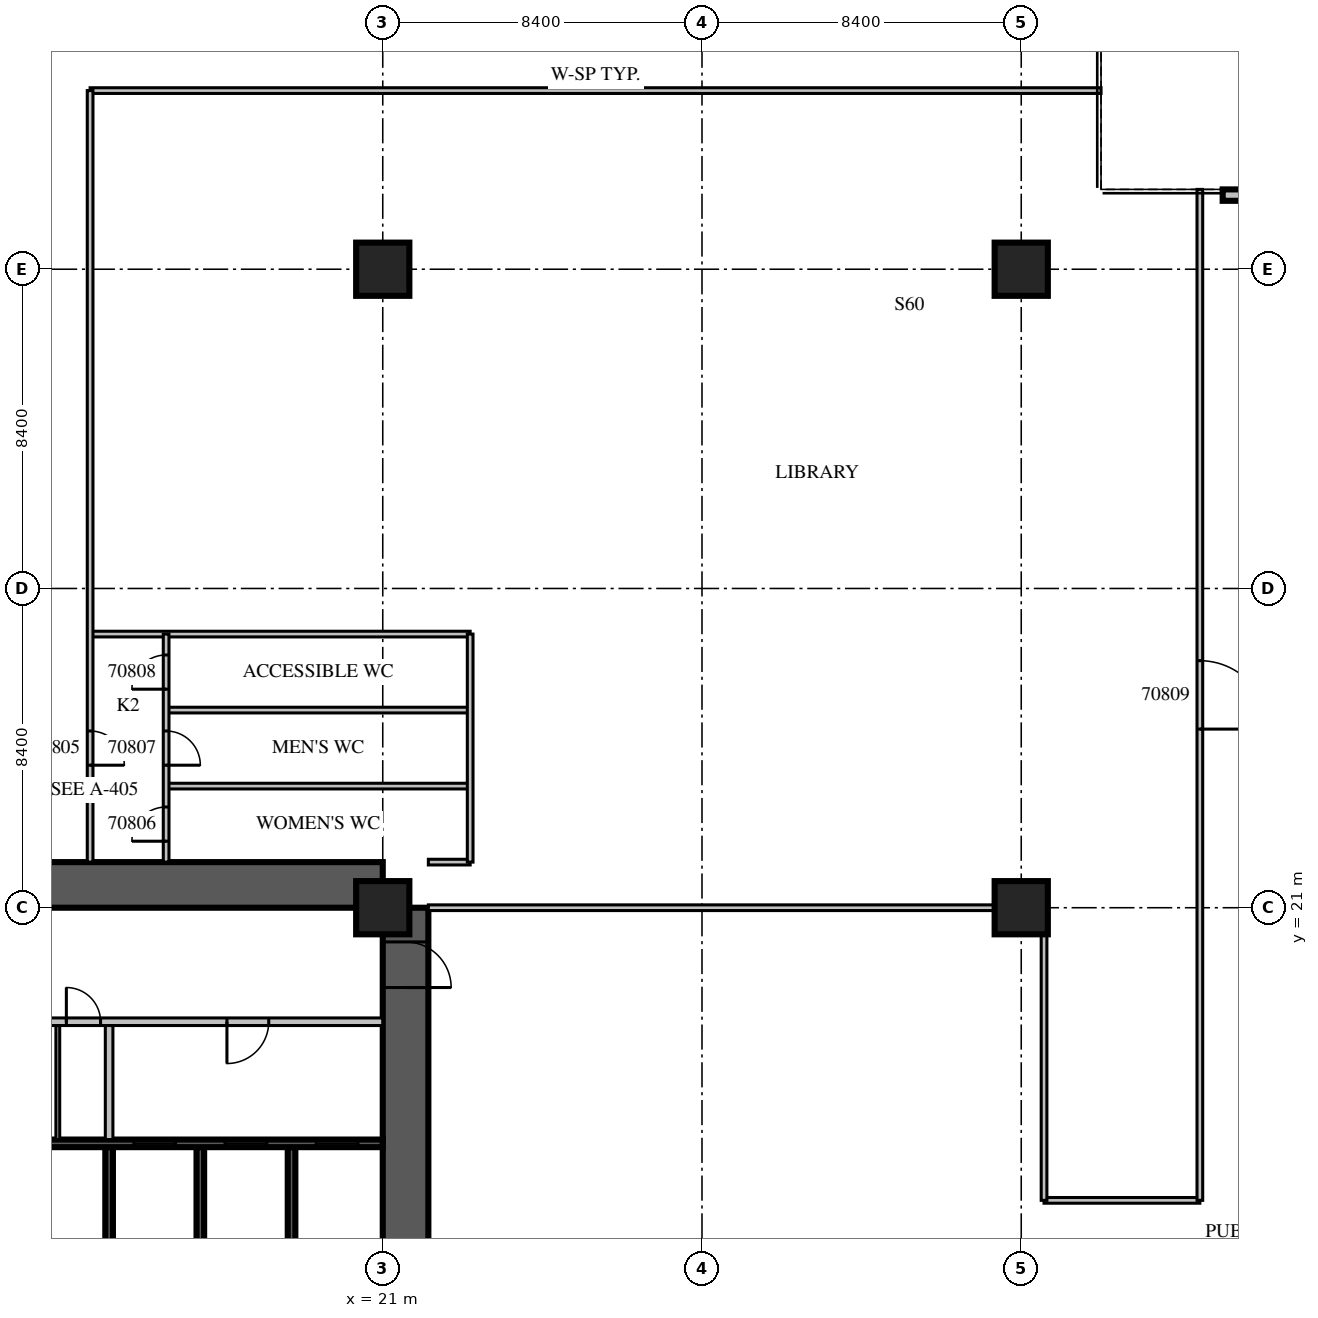
"""IFC4 building model, lengths in metres.
Left out: names, types, materials, properties, quantities, classifications, styles, units other than length and angle.
Written with IfcOpenShell. Run it as: python <this file> out.ifc"""

import sys

from ifc_helpers import new_model, si_unit, direction, frame, frame_2d, origin, origin_2d, place, context, subcontext, project, spatial, rectangle, extrude, source, transform, mapped, element, fill, save


model = new_model("IFC4")
c1 = context("Model", 3, precision=1e-05, world=origin(), true_north=direction((0.0, 1.0)))
c2 = subcontext(c1, "Body", "Model", "MODEL_VIEW")
j1 = project(units=[si_unit("LENGTHUNIT", "METRE"), si_unit("PLANEANGLEUNIT", "RADIAN")], contexts=[c1])
p1 = place(None, origin())
s1 = spatial("IfcSite", under=j1, at=p1, CompositionType="ELEMENT")
p2 = place(p1, origin())
s2 = spatial("IfcBuilding", under=s1, at=p2, CompositionType="ELEMENT")
p3 = place(p2, frame((0.0, 0.0, 29.1)))
s3 = spatial("IfcBuildingStorey", under=s2, at=p3, CompositionType="ELEMENT", Elevation=29.1)
m1 = source(origin(), c2, "Body", "SweptSolid", [
    extrude(rectangle(XDim=1.4, YDim=1.4, at=origin_2d()), origin(), (0.0, 0.0, 1.0), 5.4),
])
for number, where, z_axis, x_axis in (
    (1, (21.0, 21.0, 0.0), (0.0, 0.0, 1.0), (1.0, 0.0, 0.0)),
    (2, (21.0, 37.8, 0.0), (0.0, 0.0, 1.0), (1.0, 0.0, 0.0)),
    (3, (37.8, 21.0, 0.0), (0.0, 0.0, 1.0), (1.0, 0.0, 0.0)),
    (4, (37.8, 37.8, 0.0), (0.0, 0.0, 1.0), (1.0, 0.0, 0.0)),
):
    element("IfcColumn", number, at=place(p3, frame(where, z_axis=z_axis, x_axis=x_axis)), inside=s3, PredefinedType="COLUMN", context=c2, shape_type="MappedRepresentation", body=[
        mapped(m1, transform((0.0, 0.0, 0.0), scale=1.0)),
    ])
m2 = source(origin(), c2, "Body", "SweptSolid", [
    extrude(rectangle(XDim=16.8, YDim=1.2, at=frame_2d((8.4, 0.0))), origin(), (0.0, 0.0, 1.0), 5.4),
])
p4 = place(p3, frame((21.6, 4.2, 0.0), z_axis=(0.0, 0.0, 1.0), x_axis=(0.0, 1.0, 0.0)))
e5 = element("IfcWall", 5, at=p4, inside=s3, PredefinedType="SHEAR", context=c2, shape_type="MappedRepresentation", body=[
    mapped(m2, transform((0.0, 0.0, 0.0), scale=1.0)),
])
m3 = source(origin(), c2, "Body", "SweptSolid", [
    extrude(rectangle(XDim=2.2, YDim=2.1, at=frame_2d((1.1, 1.05))), frame((0.0, 0.61, 0.0), z_axis=(0.0, -1.0, 0.0), x_axis=(1.0, 0.0, 0.0)), (0.0, 0.0, 1.0), 1.22),
])
p5 = place(p4, frame((4.2, 0.0, 0.0)))
e6 = element("IfcOpeningElement", 6, at=p5, cuts=e5, PredefinedType="OPENING", context=c2, shape_type="MappedRepresentation", body=[
    mapped(m3, transform((0.0, 0.0, 0.0), scale=1.0)),
])
m4 = source(origin(), c2, "Body", "SweptSolid", [
    extrude(rectangle(XDim=1.2, YDim=2.1, at=frame_2d((0.6, 1.05))), frame((0.0, 0.61, 0.0), z_axis=(0.0, -1.0, 0.0), x_axis=(1.0, 0.0, 0.0)), (0.0, 0.0, 1.0), 1.22),
])
p6 = place(p4, frame((14.7, 0.0, 0.0)))
e7 = element("IfcOpeningElement", 7, at=p6, cuts=e5, PredefinedType="OPENING", context=c2, shape_type="MappedRepresentation", body=[
    mapped(m4, transform((0.0, 0.0, 0.0), scale=1.0)),
])
p7 = place(p3, frame((4.2, 21.6, 0.0), z_axis=(0.0, 0.0, 1.0), x_axis=(1.0, 0.0, 0.0)))
e8 = element("IfcWall", 8, at=p7, inside=s3, PredefinedType="SHEAR", context=c2, shape_type="MappedRepresentation", body=[
    mapped(m2, transform((0.0, 0.0, 0.0), scale=1.0)),
])
p8 = place(p7, frame((6.2, 0.0, 0.0)))
e9 = element("IfcOpeningElement", 9, at=p8, cuts=e8, PredefinedType="OPENING", context=c2, shape_type="MappedRepresentation", body=[
    mapped(m4, transform((0.0, 0.0, 0.0), scale=1.0)),
])
m5 = source(origin(), c2, "Body", "SweptSolid", [
    extrude(rectangle(XDim=3.6, YDim=0.3, at=frame_2d((1.8, 0.0))), origin(), (0.0, 0.0, 1.0), 4.8),
])
p9 = place(p3, frame((46.7, 39.75, 0.0), z_axis=(0.0, 0.0, 1.0), x_axis=(-1.0, 0.0, 0.0)))
e10 = element("IfcWall", 10, at=p9, inside=s3, PredefinedType="STANDARD", context=c2, shape_type="MappedRepresentation", body=[
    mapped(m5, transform((0.0, 0.0, 0.0), scale=1.0)),
])
m6 = source(origin(), c2, "Body", "SweptSolid", [
    extrude(rectangle(XDim=1.8, YDim=2.4, at=frame_2d((0.9, 1.2))), frame((0.0, 0.16, 0.0), z_axis=(0.0, -1.0, 0.0), x_axis=(1.0, 0.0, 0.0)), (0.0, 0.0, 1.0), 0.32),
])
p10 = place(p9, frame((0.9, 0.0, 0.0)))
e11 = element("IfcOpeningElement", 11, at=p10, cuts=e10, PredefinedType="OPENING", context=c2, shape_type="MappedRepresentation", body=[
    mapped(m6, transform((0.0, 0.0, 0.0), scale=1.0)),
])
m7 = source(origin(), c2, "Body", "SweptSolid", [
    extrude(rectangle(XDim=3.0, YDim=0.2, at=frame_2d((1.5, 0.0))), origin(), (0.0, 0.0, 1.0), 5.4),
])
for number, where, z_axis, x_axis in (
    (12, (13.8, 11.7, 0.0), (0.0, 0.0, 1.0), (0.0, 1.0, 0.0)),
    (13, (16.2, 11.7, 0.0), (0.0, 0.0, 1.0), (0.0, 1.0, 0.0)),
    (14, (18.6, 11.7, 0.0), (0.0, 0.0, 1.0), (0.0, 1.0, 0.0)),
):
    element("IfcWall", number, at=place(p3, frame(where, z_axis=z_axis, x_axis=x_axis)), inside=s3, PredefinedType="SOLIDWALL", context=c2, shape_type="MappedRepresentation", body=[
        mapped(m7, transform((0.0, 0.0, 0.0), scale=1.0)),
    ])
m8 = source(origin(), c2, "Body", "SweptSolid", [
    extrude(rectangle(XDim=16.8, YDim=0.2, at=frame_2d((8.4, 0.0))), origin(), (0.0, 0.0, 1.0), 5.4),
])
p11 = place(p3, frame((4.2, 14.8, 0.0), z_axis=(0.0, 0.0, 1.0), x_axis=(1.0, 0.0, 0.0)))
e15 = element("IfcWall", 15, at=p11, inside=s3, PredefinedType="SOLIDWALL", context=c2, shape_type="MappedRepresentation", body=[
    mapped(m8, transform((0.0, 0.0, 0.0), scale=1.0)),
])
m9 = source(origin(), c2, "Body", "SweptSolid", [
    extrude(rectangle(XDim=1.1, YDim=2.1, at=frame_2d((0.55, 1.05))), frame((0.0, 0.11, 0.0), z_axis=(0.0, -1.0, 0.0), x_axis=(1.0, 0.0, 0.0)), (0.0, 0.0, 1.0), 0.22),
])
p12 = place(p11, frame((10.25, 0.0, 0.0)))
e16 = element("IfcOpeningElement", 16, at=p12, cuts=e15, PredefinedType="OPENING", context=c2, shape_type="MappedRepresentation", body=[
    mapped(m9, transform((0.0, 0.0, 0.0), scale=1.0)),
])
p13 = place(p11, frame((12.65, 0.0, 0.0)))
e17 = element("IfcOpeningElement", 17, at=p13, cuts=e15, PredefinedType="OPENING", context=c2, shape_type="MappedRepresentation", body=[
    mapped(m9, transform((0.0, 0.0, 0.0), scale=1.0)),
])
p14 = place(p11, frame((15.05, 0.0, 0.0)))
e18 = element("IfcOpeningElement", 18, at=p14, cuts=e15, PredefinedType="OPENING", context=c2, shape_type="MappedRepresentation", body=[
    mapped(m9, transform((0.0, 0.0, 0.0), scale=1.0)),
])
m10 = source(origin(), c2, "Body", "SweptSolid", [
    extrude(rectangle(XDim=11.45, YDim=0.2, at=frame_2d((5.725, 0.0))), origin(), (0.0, 0.0, 1.0), 4.8),
])
p15 = place(p3, frame((9.55, 18.0, 0.0), z_axis=(0.0, 0.0, 1.0), x_axis=(1.0, 0.0, 0.0)))
e19 = element("IfcWall", 19, at=p15, inside=s3, PredefinedType="PARTITIONING", context=c2, shape_type="MappedRepresentation", body=[
    mapped(m10, transform((0.0, 0.0, 0.0), scale=1.0)),
])
m11 = source(origin(), c2, "Body", "SweptSolid", [
    extrude(rectangle(XDim=0.9, YDim=2.1, at=frame_2d((0.45, 1.05))), frame((0.0, 0.11, 0.0), z_axis=(0.0, -1.0, 0.0), x_axis=(1.0, 0.0, 0.0)), (0.0, 0.0, 1.0), 0.22),
])
p16 = place(p15, frame((1.075, 0.0, 0.0)))
e20 = element("IfcOpeningElement", 20, at=p16, cuts=e19, PredefinedType="OPENING", context=c2, shape_type="MappedRepresentation", body=[
    mapped(m11, transform((0.0, 0.0, 0.0), scale=1.0)),
])
p17 = place(p15, frame((3.125, 0.0, 0.0)))
e21 = element("IfcOpeningElement", 21, at=p17, cuts=e19, PredefinedType="OPENING", context=c2, shape_type="MappedRepresentation", body=[
    mapped(m11, transform((0.0, 0.0, 0.0), scale=1.0)),
])
p18 = place(p15, frame((7.35, 0.0, 0.0)))
e22 = element("IfcOpeningElement", 22, at=p18, cuts=e19, PredefinedType="OPENING", context=c2, shape_type="MappedRepresentation", body=[
    mapped(m9, transform((0.0, 0.0, 0.0), scale=1.0)),
])
m12 = source(origin(), c2, "Body", "SweptSolid", [
    extrude(rectangle(XDim=3.0, YDim=0.2, at=frame_2d((1.5, 0.0))), origin(), (0.0, 0.0, 1.0), 4.8),
])
p19 = place(p3, frame((13.8, 14.9, 0.0), z_axis=(0.0, 0.0, 1.0), x_axis=(0.0, 1.0, 0.0)))
e23 = element("IfcWall", 23, at=p19, inside=s3, PredefinedType="PARTITIONING", context=c2, shape_type="MappedRepresentation", body=[
    mapped(m12, transform((0.0, 0.0, 0.0), scale=1.0)),
])
m13 = source(origin(), c2, "Body", "SweptSolid", [
    extrude(rectangle(XDim=3.0, YDim=0.1, at=frame_2d((1.5, 0.0))), origin(), (0.0, 0.0, 1.0), 4.8),
])
p20 = place(p3, frame((12.45, 14.9, 0.0), z_axis=(0.0, 0.0, 1.0), x_axis=(0.0, 1.0, 0.0)))
e24 = element("IfcWall", 24, at=p20, inside=s3, PredefinedType="PARTITIONING", context=c2, shape_type="MappedRepresentation", body=[
    mapped(m13, transform((0.0, 0.0, 0.0), scale=1.0)),
])
m14 = source(origin(), c2, "Body", "SweptSolid", [
    extrude(rectangle(XDim=4.1, YDim=0.15, at=frame_2d((2.05, 0.0))), origin(), (0.0, 0.0, 1.0), 4.8),
])
p21 = place(p3, frame((38.4, 13.3, 0.0), z_axis=(0.0, 0.0, 1.0), x_axis=(1.0, 0.0, 0.0)))
e25 = element("IfcWall", 25, at=p21, inside=s3, PredefinedType="PARTITIONING", context=c2, shape_type="MappedRepresentation", body=[
    mapped(m14, transform((0.0, 0.0, 0.0), scale=1.0)),
])
m15 = source(origin(), c2, "Body", "SweptSolid", [
    extrude(rectangle(XDim=16.2, YDim=0.15, at=frame_2d((8.1, 0.0))), origin(), (0.0, 0.0, 1.0), 4.8),
])
p22 = place(p3, frame((22.2, 21.0, 0.0), z_axis=(0.0, 0.0, 1.0), x_axis=(1.0, 0.0, 0.0)))
e26 = element("IfcWall", 26, at=p22, inside=s3, PredefinedType="PARTITIONING", context=c2, shape_type="MappedRepresentation", body=[
    mapped(m15, transform((0.0, 0.0, 0.0), scale=1.0)),
])
m16 = source(origin(), c2, "Body", "SweptSolid", [
    extrude(rectangle(XDim=1.1, YDim=0.15, at=frame_2d((0.55, 0.0))), origin(), (0.0, 0.0, 1.0), 4.8),
])
p23 = place(p3, frame((22.2, 22.2, 0.0), z_axis=(0.0, 0.0, 1.0), x_axis=(1.0, 0.0, 0.0)))
e27 = element("IfcWall", 27, at=p23, inside=s3, PredefinedType="PARTITIONING", context=c2, shape_type="MappedRepresentation", body=[
    mapped(m16, transform((0.0, 0.0, 0.0), scale=1.0)),
])
m17 = source(origin(), c2, "Body", "SweptSolid", [
    extrude(rectangle(XDim=8.0, YDim=0.15, at=frame_2d((4.0, 0.0))), origin(), (0.0, 0.0, 1.0), 4.8),
])
for number, where, z_axis, x_axis in (
    (28, (15.3, 24.2, 0.0), (0.0, 0.0, 1.0), (1.0, 0.0, 0.0)),
    (29, (15.3, 26.2, 0.0), (0.0, 0.0, 1.0), (1.0, 0.0, 0.0)),
):
    element("IfcWall", number, at=place(p3, frame(where, z_axis=z_axis, x_axis=x_axis)), inside=s3, PredefinedType="PARTITIONING", context=c2, shape_type="MappedRepresentation", body=[
        mapped(m17, transform((0.0, 0.0, 0.0), scale=1.0)),
    ])
m18 = source(origin(), c2, "Body", "SweptSolid", [
    extrude(rectangle(XDim=10.0, YDim=0.15, at=frame_2d((5.0, 0.0))), origin(), (0.0, 0.0, 1.0), 4.8),
])
p24 = place(p3, frame((13.3, 28.2, 0.0), z_axis=(0.0, 0.0, 1.0), x_axis=(1.0, 0.0, 0.0)))
e30 = element("IfcWall", 30, at=p24, inside=s3, PredefinedType="PARTITIONING", context=c2, shape_type="MappedRepresentation", body=[
    mapped(m18, transform((0.0, 0.0, 0.0), scale=1.0)),
])
p25 = place(p3, frame((13.3, 42.5, 0.0), z_axis=(0.0, 0.0, 1.0), x_axis=(1.0, 0.0, 0.0)))
e31 = element("IfcWall", 31, at=p25, inside=s3, PredefinedType="PARTITIONING", context=c2, shape_type="SweptSolid", body=[
    extrude(rectangle(XDim=26.6, YDim=0.15, at=frame_2d((13.3, 0.0))), origin(), (0.0, 0.0, 1.0), 4.8),
])
m19 = source(origin(), c2, "Body", "SweptSolid", [
    extrude(rectangle(XDim=20.3, YDim=0.15, at=frame_2d((10.15, 0.0))), origin(), (0.0, 0.0, 1.0), 4.8),
])
p26 = place(p3, frame((13.3, 22.2, 0.0), z_axis=(0.0, 0.0, 1.0), x_axis=(0.0, 1.0, 0.0)))
e32 = element("IfcWall", 32, at=p26, inside=s3, PredefinedType="PARTITIONING", context=c2, shape_type="MappedRepresentation", body=[
    mapped(m19, transform((0.0, 0.0, 0.0), scale=1.0)),
])
m20 = source(origin(), c2, "Body", "SweptSolid", [
    extrude(rectangle(XDim=0.9, YDim=2.1, at=frame_2d((0.45, 1.05))), frame((0.0, 0.085, 0.0), z_axis=(0.0, -1.0, 0.0), x_axis=(1.0, 0.0, 0.0)), (0.0, 0.0, 1.0), 0.17),
])
p27 = place(p26, frame((2.55, 0.0, 0.0)))
e33 = element("IfcOpeningElement", 33, at=p27, cuts=e32, PredefinedType="OPENING", context=c2, shape_type="MappedRepresentation", body=[
    mapped(m20, transform((0.0, 0.0, 0.0), scale=1.0)),
])
m21 = source(origin(), c2, "Body", "SweptSolid", [
    extrude(rectangle(XDim=6.0, YDim=0.15, at=frame_2d((3.0, 0.0))), origin(), (0.0, 0.0, 1.0), 4.8),
])
p28 = place(p3, frame((15.3, 22.2, 0.0), z_axis=(0.0, 0.0, 1.0), x_axis=(0.0, 1.0, 0.0)))
e34 = element("IfcWall", 34, at=p28, inside=s3, PredefinedType="PARTITIONING", context=c2, shape_type="MappedRepresentation", body=[
    mapped(m21, transform((0.0, 0.0, 0.0), scale=1.0)),
])
p29 = place(p28, frame((0.55, 0.0, 0.0)))
e35 = element("IfcOpeningElement", 35, at=p29, cuts=e34, PredefinedType="OPENING", context=c2, shape_type="MappedRepresentation", body=[
    mapped(m20, transform((0.0, 0.0, 0.0), scale=1.0)),
])
p30 = place(p28, frame((2.55, 0.0, 0.0)))
e36 = element("IfcOpeningElement", 36, at=p30, cuts=e34, PredefinedType="OPENING", context=c2, shape_type="MappedRepresentation", body=[
    mapped(m20, transform((0.0, 0.0, 0.0), scale=1.0)),
])
p31 = place(p28, frame((4.55, 0.0, 0.0)))
e37 = element("IfcOpeningElement", 37, at=p31, cuts=e34, PredefinedType="OPENING", context=c2, shape_type="MappedRepresentation", body=[
    mapped(m20, transform((0.0, 0.0, 0.0), scale=1.0)),
])
p32 = place(p3, frame((23.3, 22.2, 0.0), z_axis=(0.0, 0.0, 1.0), x_axis=(0.0, 1.0, 0.0)))
e38 = element("IfcWall", 38, at=p32, inside=s3, PredefinedType="PARTITIONING", context=c2, shape_type="MappedRepresentation", body=[
    mapped(m21, transform((0.0, 0.0, 0.0), scale=1.0)),
])
m22 = source(origin(), c2, "Body", "SweptSolid", [
    extrude(rectangle(XDim=7.7, YDim=0.15, at=frame_2d((3.85, 0.0))), origin(), (0.0, 0.0, 1.0), 4.8),
])
p33 = place(p3, frame((38.4, 13.3, 0.0), z_axis=(0.0, 0.0, 1.0), x_axis=(0.0, 1.0, 0.0)))
e39 = element("IfcWall", 39, at=p33, inside=s3, PredefinedType="PARTITIONING", context=c2, shape_type="MappedRepresentation", body=[
    mapped(m22, transform((0.0, 0.0, 0.0), scale=1.0)),
])
m23 = source(origin(), c2, "Body", "SweptSolid", [
    extrude(rectangle(XDim=26.6, YDim=0.15, at=frame_2d((13.3, 0.0))), origin(), (0.0, 0.0, 1.0), 4.8),
])
p34 = place(p3, frame((42.5, 13.3, 0.0), z_axis=(0.0, 0.0, 1.0), x_axis=(0.0, 1.0, 0.0)))
e40 = element("IfcWall", 40, at=p34, inside=s3, PredefinedType="PARTITIONING", context=c2, shape_type="MappedRepresentation", body=[
    mapped(m23, transform((0.0, 0.0, 0.0), scale=1.0)),
])
m24 = source(origin(), c2, "Body", "SweptSolid", [
    extrude(rectangle(XDim=1.8, YDim=2.1, at=frame_2d((0.9, 1.05))), frame((0.0, 0.085, 0.0), z_axis=(0.0, -1.0, 0.0), x_axis=(1.0, 0.0, 0.0)), (0.0, 0.0, 1.0), 0.17),
])
p35 = place(p34, frame((12.4, 0.0, 0.0)))
e41 = element("IfcOpeningElement", 41, at=p35, cuts=e40, PredefinedType="OPENING", context=c2, shape_type="MappedRepresentation", body=[
    mapped(m24, transform((0.0, 0.0, 0.0), scale=1.0)),
])
m25 = source(origin(), c2, "Body", "SweptSolid", [
    extrude(rectangle(XDim=1.1, YDim=2.1, at=frame_2d((0.55, 1.05))), frame((0.0, 0.025, 0.0), z_axis=(0.0, -1.0, 0.0), x_axis=(1.0, 0.0, 0.0)), (0.0, 0.0, 1.0), 0.05),
])
p36 = place(p12, origin())
e42 = element("IfcDoor", 42, at=p36, inside=s3, OperationType="SLIDING_TO_LEFT", PredefinedType="DOOR", context=c2, shape_type="MappedRepresentation", body=[
    mapped(m25, transform((0.0, 0.0, 0.0), scale=1.0)),
])
fill(e16, e42)
p37 = place(p13, origin())
e43 = element("IfcDoor", 43, at=p37, inside=s3, OperationType="SLIDING_TO_LEFT", PredefinedType="DOOR", context=c2, shape_type="MappedRepresentation", body=[
    mapped(m25, transform((0.0, 0.0, 0.0), scale=1.0)),
])
fill(e17, e43)
p38 = place(p14, origin())
e44 = element("IfcDoor", 44, at=p38, inside=s3, OperationType="SLIDING_TO_LEFT", PredefinedType="DOOR", context=c2, shape_type="MappedRepresentation", body=[
    mapped(m25, transform((0.0, 0.0, 0.0), scale=1.0)),
])
fill(e18, e44)
m26 = source(origin(), c2, "Body", "SweptSolid", [
    extrude(rectangle(XDim=0.9, YDim=2.1, at=frame_2d((0.45, 1.05))), frame((0.0, 0.025, 0.0), z_axis=(0.0, -1.0, 0.0), x_axis=(1.0, 0.0, 0.0)), (0.0, 0.0, 1.0), 0.05),
])
p39 = place(p17, origin())
e45 = element("IfcDoor", 45, at=p39, inside=s3, OperationType="SINGLE_SWING_LEFT", PredefinedType="DOOR", context=c2, shape_type="MappedRepresentation", body=[
    mapped(m26, transform((0.0, 0.0, 0.0), scale=1.0)),
])
fill(e21, e45)
p40 = place(p18, origin())
e46 = element("IfcDoor", 46, at=p40, inside=s3, OperationType="SINGLE_SWING_RIGHT", PredefinedType="DOOR", context=c2, shape_type="MappedRepresentation", body=[
    mapped(m25, transform((0.0, 0.0, 0.0), scale=1.0)),
])
fill(e22, e46)
m27 = source(origin(), c2, "Body", "SweptSolid", [
    extrude(rectangle(XDim=1.2, YDim=2.1, at=frame_2d((0.6, 1.05))), frame((0.0, 0.025, 0.0), z_axis=(0.0, -1.0, 0.0), x_axis=(1.0, 0.0, 0.0)), (0.0, 0.0, 1.0), 0.05),
])
p41 = place(p6, origin())
e47 = element("IfcDoor", 47, at=p41, inside=s3, OperationType="SINGLE_SWING_RIGHT", PredefinedType="DOOR", context=c2, shape_type="MappedRepresentation", body=[
    mapped(m27, transform((0.0, 0.0, 0.0), scale=1.0)),
])
fill(e7, e47)
p42 = place(p27, origin())
e48 = element("IfcDoor", 48, at=p42, inside=s3, OperationType="SINGLE_SWING_RIGHT", PredefinedType="DOOR", context=c2, shape_type="MappedRepresentation", body=[
    mapped(m26, transform((0.0, 0.0, 0.0), scale=1.0)),
])
fill(e33, e48)
p43 = place(p29, origin())
e49 = element("IfcDoor", 49, at=p43, inside=s3, OperationType="SINGLE_SWING_LEFT", PredefinedType="DOOR", context=c2, shape_type="MappedRepresentation", body=[
    mapped(m26, transform((0.0, 0.0, 0.0), scale=1.0)),
])
fill(e35, e49)
p44 = place(p30, origin())
e50 = element("IfcDoor", 50, at=p44, inside=s3, OperationType="SINGLE_SWING_RIGHT", PredefinedType="DOOR", context=c2, shape_type="MappedRepresentation", body=[
    mapped(m26, transform((0.0, 0.0, 0.0), scale=1.0)),
])
fill(e36, e50)
p45 = place(p31, origin())
e51 = element("IfcDoor", 51, at=p45, inside=s3, OperationType="SINGLE_SWING_LEFT", PredefinedType="DOOR", context=c2, shape_type="MappedRepresentation", body=[
    mapped(m26, transform((0.0, 0.0, 0.0), scale=1.0)),
])
fill(e37, e51)
m28 = source(origin(), c2, "Body", "SweptSolid", [
    extrude(rectangle(XDim=1.8, YDim=2.1, at=frame_2d((0.9, 1.05))), frame((0.0, 0.025, 0.0), z_axis=(0.0, -1.0, 0.0), x_axis=(1.0, 0.0, 0.0)), (0.0, 0.0, 1.0), 0.05),
])
p46 = place(p35, origin())
e52 = element("IfcDoor", 52, at=p46, inside=s3, OperationType="DOUBLE_DOOR_SINGLE_SWING", PredefinedType="DOOR", context=c2, shape_type="MappedRepresentation", body=[
    mapped(m28, transform((0.0, 0.0, 0.0), scale=1.0)),
])
fill(e41, e52)
save(model, sys.argv[1])
